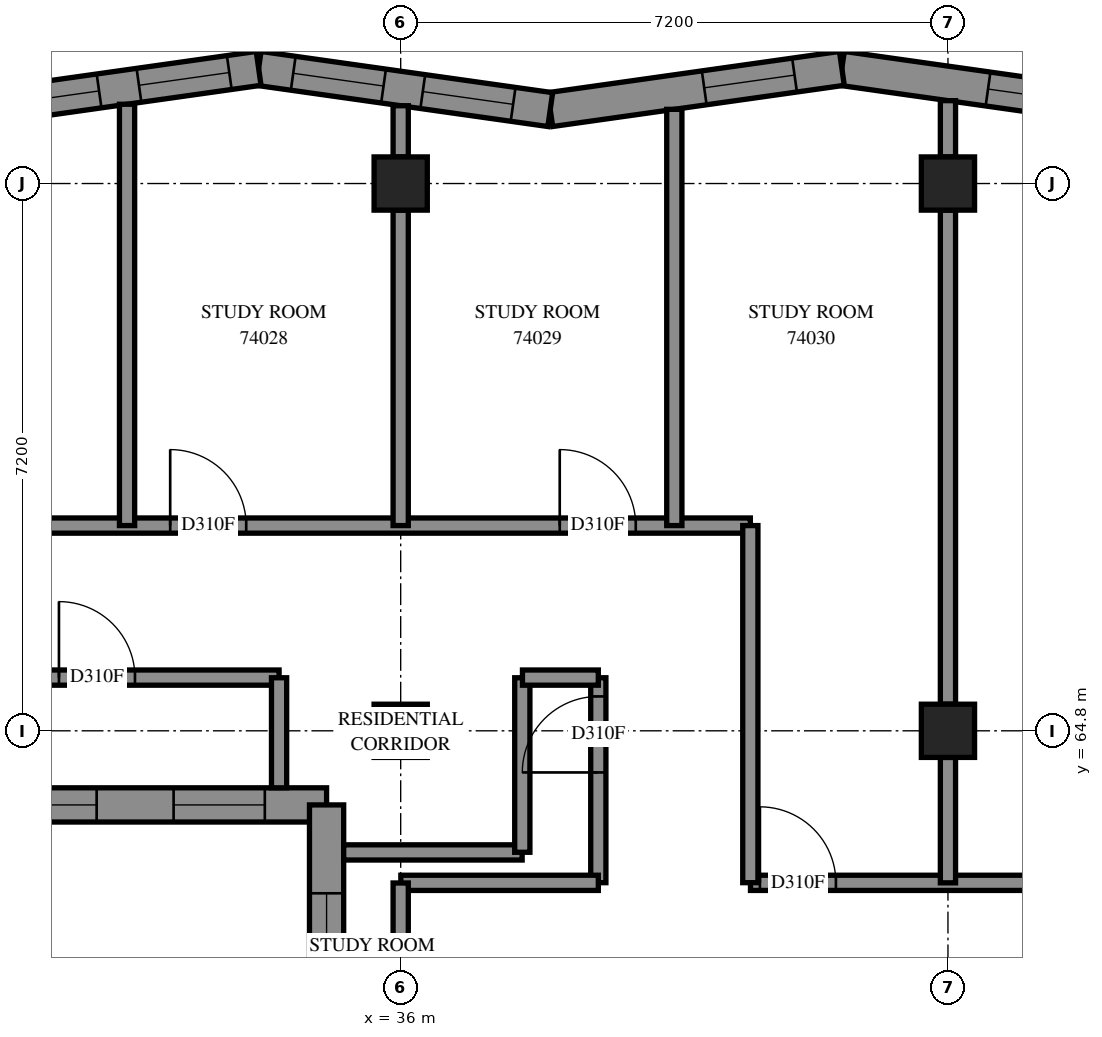
"""IFC4 building model, lengths in metres.
Left out: names, types, materials, properties, quantities, classifications, styles, units other than length and angle.
Written with IfcOpenShell. Run it as: python <this file> out.ifc"""

import sys

from ifc_helpers import new_model, si_unit, direction, frame, frame_2d, origin, origin_2d, place, context, subcontext, project, spatial, polyline, rectangle, outline, extrude, element, fill, save


model = new_model("IFC4")
c1 = context("Model", 3, precision=1e-05, world=origin(), true_north=direction((0.0, 1.0)))
c2 = subcontext(c1, "Body", "Model", "MODEL_VIEW")
j1 = project(units=[si_unit("LENGTHUNIT", "METRE"), si_unit("PLANEANGLEUNIT", "RADIAN")], contexts=[c1])
p1 = place(None, origin())
s1 = spatial("IfcSite", under=j1, at=p1, CompositionType="ELEMENT")
p2 = place(p1, origin())
s2 = spatial("IfcBuilding", under=s1, at=p2, CompositionType="ELEMENT")
p3 = place(p2, frame((0.0, 0.0, 271.0)))
s3 = spatial("IfcBuildingStorey", under=s2, at=p3, CompositionType="ELEMENT", Elevation=271.0)
for number, where, z_axis, x_axis in (
    (1, (36.0, 64.8, 0.0), (0.0, 0.0, 1.0), (1.0, 0.0, 0.0)),
    (2, (36.0, 72.0, 0.0), (0.0, 0.0, 1.0), (1.0, 0.0, 0.0)),
    (3, (43.2, 64.8, 0.0), (0.0, 0.0, 1.0), (1.0, 0.0, 0.0)),
    (4, (43.2, 72.0, 0.0), (0.0, 0.0, 1.0), (1.0, 0.0, 0.0)),
):
    element("IfcColumn", number, at=place(p3, frame(where, z_axis=z_axis, x_axis=x_axis)), inside=s3, PredefinedType="COLUMN", context=c2, shape_type="SweptSolid", body=[
        extrude(rectangle(XDim=0.7, YDim=0.7, at=origin_2d()), origin(), (0.0, 0.0, 1.0), 3.1),
    ])
p4 = place(p3, frame((45.641, 72.973, 0.0), z_axis=(0.0, 0.0, 1.0), x_axis=(-0.9901681853, 0.1398819675, 0.0)))
e5 = element("IfcWall", 5, at=p4, inside=s3, PredefinedType="SOLIDWALL", context=c2, shape_type="SweptSolid", body=[
    extrude(outline(polyline([(0.032, -0.225), (3.906, -0.225), (3.843, 0.225), (-0.032, 0.225), (0.032, -0.225)])), origin(), (0.0, 0.0, 1.0), 3.1),
])
p5 = place(p4, frame((0.733, 0.0, 0.45)))
e6 = element("IfcOpeningElement", 6, at=p5, cuts=e5, PredefinedType="OPENING", context=c2, shape_type="SweptSolid", body=[
    extrude(rectangle(XDim=1.2, YDim=2.55, at=frame_2d((0.6, 1.275))), frame((0.0, 0.235, 0.0), z_axis=(0.0, -1.0, 0.0), x_axis=(1.0, 0.0, 0.0)), (0.0, 0.0, 1.0), 0.47),
])
p6 = place(p3, frame((41.804, 73.515, 0.0), z_axis=(0.0, 0.0, 1.0), x_axis=(-0.9901681853, -0.1398819675, 0.0)))
e7 = element("IfcWall", 7, at=p6, inside=s3, PredefinedType="SOLIDWALL", context=c2, shape_type="SweptSolid", body=[
    extrude(outline(polyline([(-0.032, -0.225), (3.843, -0.225), (3.906, 0.225), (0.032, 0.225), (-0.032, -0.225)])), origin(), (0.0, 0.0, 1.0), 3.1),
])
p7 = place(p6, frame((0.629, 0.0, 0.45)))
e8 = element("IfcOpeningElement", 8, at=p7, cuts=e7, PredefinedType="OPENING", context=c2, shape_type="SweptSolid", body=[
    extrude(rectangle(XDim=1.2, YDim=2.55, at=frame_2d((0.6, 1.275))), frame((0.0, 0.235, 0.0), z_axis=(0.0, -1.0, 0.0), x_axis=(1.0, 0.0, 0.0)), (0.0, 0.0, 1.0), 0.47),
])
p8 = place(p3, frame((37.968, 72.973, 0.0), z_axis=(0.0, 0.0, 1.0), x_axis=(-0.9901676803, 0.1398855422, 0.0)))
e9 = element("IfcWall", 9, at=p8, inside=s3, PredefinedType="SOLIDWALL", context=c2, shape_type="SweptSolid", body=[
    extrude(outline(polyline([(0.032, -0.225), (3.906, -0.225), (3.843, 0.225), (-0.032, 0.225), (0.032, -0.225)])), origin(), (0.0, 0.0, 1.0), 3.1),
])
p9 = place(p8, frame((0.494, 0.0, 0.45)))
e10 = element("IfcOpeningElement", 10, at=p9, cuts=e9, PredefinedType="OPENING", context=c2, shape_type="SweptSolid", body=[
    extrude(rectangle(XDim=1.2, YDim=2.55, at=frame_2d((0.6, 1.275))), frame((0.0, 0.235, 0.0), z_axis=(0.0, -1.0, 0.0), x_axis=(1.0, 0.0, 0.0)), (0.0, 0.0, 1.0), 0.47),
])
p10 = place(p8, frame((2.215, 0.0, 0.45)))
e11 = element("IfcOpeningElement", 11, at=p10, cuts=e9, PredefinedType="OPENING", context=c2, shape_type="SweptSolid", body=[
    extrude(rectangle(XDim=1.2, YDim=2.55, at=frame_2d((0.6, 1.275))), frame((0.0, 0.235, 0.0), z_axis=(0.0, -1.0, 0.0), x_axis=(1.0, 0.0, 0.0)), (0.0, 0.0, 1.0), 0.47),
])
p11 = place(p3, frame((34.131, 73.515, 0.0), z_axis=(0.0, 0.0, 1.0), x_axis=(-0.9901656891, -0.1398996361, 0.0)))
e12 = element("IfcWall", 12, at=p11, inside=s3, PredefinedType="SOLIDWALL", context=c2, shape_type="SweptSolid", body=[
    extrude(outline(polyline([(-0.032, -0.225), (3.843, -0.225), (3.941, 0.225), (0.032, 0.225), (-0.032, -0.225)])), origin(), (0.0, 0.0, 1.0), 3.1),
])
p12 = place(p11, frame((0.39, 0.0, 0.45)))
e13 = element("IfcOpeningElement", 13, at=p12, cuts=e12, PredefinedType="OPENING", context=c2, shape_type="SweptSolid", body=[
    extrude(rectangle(XDim=1.2, YDim=2.55, at=frame_2d((0.6, 1.275))), frame((0.0, 0.235, 0.0), z_axis=(0.0, -1.0, 0.0), x_axis=(1.0, 0.0, 0.0)), (0.0, 0.0, 1.0), 0.47),
])
p13 = place(p11, frame((2.12, 0.0, 0.45)))
e14 = element("IfcOpeningElement", 14, at=p13, cuts=e12, PredefinedType="OPENING", context=c2, shape_type="SweptSolid", body=[
    extrude(rectangle(XDim=1.2, YDim=2.55, at=frame_2d((0.6, 1.275))), frame((0.0, 0.235, 0.0), z_axis=(0.0, -1.0, 0.0), x_axis=(1.0, 0.0, 0.0)), (0.0, 0.0, 1.0), 0.47),
])
p14 = place(p3, frame((26.683, 63.825, 0.0), z_axis=(0.0, 0.0, 1.0), x_axis=(1.0, 0.0, 0.0)))
e15 = element("IfcWall", 15, at=p14, inside=s3, PredefinedType="SOLIDWALL", context=c2, shape_type="SweptSolid", body=[
    extrude(outline(polyline([(-0.225, -0.225), (8.117, -0.225), (8.567, 0.225), (0.225, 0.225), (-0.225, -0.225)])), origin(), (0.0, 0.0, 1.0), 3.1),
])
p15 = place(p14, frame((2.517, 0.0, 0.45)))
e16 = element("IfcOpeningElement", 16, at=p15, cuts=e15, PredefinedType="OPENING", context=c2, shape_type="SweptSolid", body=[
    extrude(rectangle(XDim=2.8, YDim=2.55, at=frame_2d((1.4, 1.275))), frame((0.0, 0.235, 0.0), z_axis=(0.0, -1.0, 0.0), x_axis=(1.0, 0.0, 0.0)), (0.0, 0.0, 1.0), 0.47),
])
p16 = place(p14, frame((0.671, 0.0, 0.45)))
e17 = element("IfcOpeningElement", 17, at=p16, cuts=e15, PredefinedType="OPENING", context=c2, shape_type="SweptSolid", body=[
    extrude(rectangle(XDim=1.2, YDim=2.55, at=frame_2d((0.6, 1.275))), frame((0.0, 0.235, 0.0), z_axis=(0.0, -1.0, 0.0), x_axis=(1.0, 0.0, 0.0)), (0.0, 0.0, 1.0), 0.47),
])
p17 = place(p14, frame((6.33, 0.0, 0.45)))
e18 = element("IfcOpeningElement", 18, at=p17, cuts=e15, PredefinedType="OPENING", context=c2, shape_type="SweptSolid", body=[
    extrude(rectangle(XDim=1.2, YDim=2.55, at=frame_2d((0.6, 1.275))), frame((0.0, 0.235, 0.0), z_axis=(0.0, -1.0, 0.0), x_axis=(1.0, 0.0, 0.0)), (0.0, 0.0, 1.0), 0.47),
])
p18 = place(p3, frame((35.025, 63.825, 0.0), z_axis=(0.0, 0.0, 1.0), x_axis=(0.0, -1.0, 0.0)))
e19 = element("IfcWall", 19, at=p18, inside=s3, PredefinedType="SOLIDWALL", context=c2, shape_type="SweptSolid", body=[
    extrude(outline(polyline([(0.225, -0.225), (7.425, -0.225), (6.975, 0.225), (-0.225, 0.225), (0.225, -0.225)])), origin(), (0.0, 0.0, 1.0), 3.1),
])
p19 = place(p18, frame((3.175, 0.0, 0.45)))
e20 = element("IfcOpeningElement", 20, at=p19, cuts=e19, PredefinedType="OPENING", context=c2, shape_type="SweptSolid", body=[
    extrude(rectangle(XDim=2.8, YDim=2.55, at=frame_2d((1.4, 1.275))), frame((0.0, 0.235, 0.0), z_axis=(0.0, -1.0, 0.0), x_axis=(1.0, 0.0, 0.0)), (0.0, 0.0, 1.0), 0.47),
])
p20 = place(p18, frame((1.163, 0.0, 0.45)))
e21 = element("IfcOpeningElement", 21, at=p20, cuts=e19, PredefinedType="OPENING", context=c2, shape_type="SweptSolid", body=[
    extrude(rectangle(XDim=1.2, YDim=2.55, at=frame_2d((0.6, 1.275))), frame((0.0, 0.235, 0.0), z_axis=(0.0, -1.0, 0.0), x_axis=(1.0, 0.0, 0.0)), (0.0, 0.0, 1.0), 0.47),
])
p21 = place(p3, frame((40.602, 62.8, 0.0), z_axis=(0.0, 0.0, 1.0), x_axis=(1.0, 0.0, 0.0)))
e22 = element("IfcWall", 22, at=p21, inside=s3, PredefinedType="PARTITIONING", context=c2, shape_type="SweptSolid", body=[
    extrude(rectangle(XDim=14.598, YDim=0.2, at=frame_2d((7.299, 0.0))), origin(), (0.0, 0.0, 1.0), 3.1),
])
p22 = place(p21, frame((0.124, 0.0, 0.0)))
e23 = element("IfcOpeningElement", 23, at=p22, cuts=e22, PredefinedType="OPENING", context=c2, shape_type="SweptSolid", body=[
    extrude(rectangle(XDim=1.0, YDim=2.1, at=frame_2d((0.5, 1.05))), frame((0.0, 0.11, 0.0), z_axis=(0.0, -1.0, 0.0), x_axis=(1.0, 0.0, 0.0)), (0.0, 0.0, 1.0), 0.22),
])
p23 = place(p21, frame((4.691, 0.0, 0.0)))
e24 = element("IfcOpeningElement", 24, at=p23, cuts=e22, PredefinedType="OPENING", context=c2, shape_type="SweptSolid", body=[
    extrude(rectangle(XDim=1.0, YDim=2.1, at=frame_2d((0.5, 1.05))), frame((0.0, 0.11, 0.0), z_axis=(0.0, -1.0, 0.0), x_axis=(1.0, 0.0, 0.0)), (0.0, 0.0, 1.0), 0.22),
])
p24 = place(p21, frame((6.766, 0.0, 0.0)))
e25 = element("IfcOpeningElement", 25, at=p24, cuts=e22, PredefinedType="OPENING", context=c2, shape_type="SweptSolid", body=[
    extrude(rectangle(XDim=1.0, YDim=2.1, at=frame_2d((0.5, 1.05))), frame((0.0, 0.11, 0.0), z_axis=(0.0, -1.0, 0.0), x_axis=(1.0, 0.0, 0.0)), (0.0, 0.0, 1.0), 0.22),
])
p25 = place(p21, frame((11.89, 0.0, 0.0)))
e26 = element("IfcOpeningElement", 26, at=p25, cuts=e22, PredefinedType="OPENING", context=c2, shape_type="SweptSolid", body=[
    extrude(rectangle(XDim=1.0, YDim=2.1, at=frame_2d((0.5, 1.05))), frame((0.0, 0.11, 0.0), z_axis=(0.0, -1.0, 0.0), x_axis=(1.0, 0.0, 0.0)), (0.0, 0.0, 1.0), 0.22),
])
p26 = place(p3, frame((28.802, 67.5, 0.0), z_axis=(0.0, 0.0, 1.0), x_axis=(1.0, 0.0, 0.0)))
e27 = element("IfcWall", 27, at=p26, inside=s3, PredefinedType="PARTITIONING", context=c2, shape_type="SweptSolid", body=[
    extrude(rectangle(XDim=11.798, YDim=0.2, at=frame_2d((5.899, 0.0))), origin(), (0.0, 0.0, 1.0), 3.1),
])
p27 = place(p26, frame((4.165, 0.0, 0.0)))
e28 = element("IfcOpeningElement", 28, at=p27, cuts=e27, PredefinedType="OPENING", context=c2, shape_type="SweptSolid", body=[
    extrude(rectangle(XDim=1.0, YDim=2.1, at=frame_2d((0.5, 1.05))), frame((0.0, 0.11, 0.0), z_axis=(0.0, -1.0, 0.0), x_axis=(1.0, 0.0, 0.0)), (0.0, 0.0, 1.0), 0.22),
])
p28 = place(p26, frame((9.29, 0.0, 0.0)))
e29 = element("IfcOpeningElement", 29, at=p28, cuts=e27, PredefinedType="OPENING", context=c2, shape_type="SweptSolid", body=[
    extrude(rectangle(XDim=1.0, YDim=2.1, at=frame_2d((0.5, 1.05))), frame((0.0, 0.11, 0.0), z_axis=(0.0, -1.0, 0.0), x_axis=(1.0, 0.0, 0.0)), (0.0, 0.0, 1.0), 0.22),
])
p29 = place(p3, frame((43.2, 65.15, 0.0), z_axis=(0.0, 0.0, 1.0), x_axis=(0.0, 1.0, 0.0)))
e30 = element("IfcWall", 30, at=p29, inside=s3, PredefinedType="PARTITIONING", context=c2, shape_type="SweptSolid", body=[
    extrude(rectangle(XDim=6.5, YDim=0.2, at=frame_2d((3.25, 0.0))), origin(), (0.0, 0.0, 1.0), 3.1),
])
p30 = place(p3, frame((28.802, 65.5, 0.0), z_axis=(0.0, 0.0, 1.0), x_axis=(1.0, 0.0, 0.0)))
e31 = element("IfcWall", 31, at=p30, inside=s3, PredefinedType="PARTITIONING", context=c2, shape_type="SweptSolid", body=[
    extrude(rectangle(XDim=5.598, YDim=0.2, at=frame_2d((2.799, 0.0))), origin(), (0.0, 0.0, 1.0), 3.1),
])
p31 = place(p30, frame((2.702, 0.0, 0.0)))
e32 = element("IfcOpeningElement", 32, at=p31, cuts=e31, PredefinedType="OPENING", context=c2, shape_type="SweptSolid", body=[
    extrude(rectangle(XDim=1.0, YDim=2.1, at=frame_2d((0.5, 1.05))), frame((0.0, 0.11, 0.0), z_axis=(0.0, -1.0, 0.0), x_axis=(1.0, 0.0, 0.0)), (0.0, 0.0, 1.0), 0.22),
])
p32 = place(p3, frame((32.4, 67.5, 0.0), z_axis=(0.0, 0.0, 1.0), x_axis=(0.0, 1.0, 0.0)))
e33 = element("IfcWall", 33, at=p32, inside=s3, PredefinedType="PARTITIONING", context=c2, shape_type="SweptSolid", body=[
    extrude(rectangle(XDim=5.543, YDim=0.2, at=frame_2d((2.772, 0.0))), origin(), (0.0, 0.0, 1.0), 3.1),
])
p33 = place(p3, frame((39.6, 67.5, 0.0), z_axis=(0.0, 0.0, 1.0), x_axis=(0.0, 1.0, 0.0)))
e34 = element("IfcWall", 34, at=p33, inside=s3, PredefinedType="PARTITIONING", context=c2, shape_type="SweptSolid", body=[
    extrude(rectangle(XDim=5.476, YDim=0.2, at=frame_2d((2.738, 0.0))), origin(), (0.0, 0.0, 1.0), 3.1),
])
p34 = place(p3, frame((40.6, 62.802, 0.0), z_axis=(0.0, 0.0, 1.0), x_axis=(0.0, 1.0, 0.0)))
e35 = element("IfcWall", 35, at=p34, inside=s3, PredefinedType="PARTITIONING", context=c2, shape_type="SweptSolid", body=[
    extrude(rectangle(XDim=4.698, YDim=0.2, at=frame_2d((2.349, 0.0))), origin(), (0.0, 0.0, 1.0), 3.1),
])
p35 = place(p3, frame((36.0, 67.5, 0.0), z_axis=(0.0, 0.0, 1.0), x_axis=(0.0, 1.0, 0.0)))
e36 = element("IfcWall", 36, at=p35, inside=s3, PredefinedType="PARTITIONING", context=c2, shape_type="SweptSolid", body=[
    extrude(rectangle(XDim=4.15, YDim=0.2, at=frame_2d((2.075, 0.0))), origin(), (0.0, 0.0, 1.0), 3.1),
])
p36 = place(p3, frame((38.6, 62.802, 0.0), z_axis=(0.0, 0.0, 1.0), x_axis=(0.0, 1.0, 0.0)))
e37 = element("IfcWall", 37, at=p36, inside=s3, PredefinedType="PARTITIONING", context=c2, shape_type="SweptSolid", body=[
    extrude(rectangle(XDim=2.696, YDim=0.2, at=frame_2d((1.348, 0.0))), origin(), (0.0, 0.0, 1.0), 3.1),
])
p37 = place(p36, frame((1.45, 0.0, 0.0)))
e38 = element("IfcOpeningElement", 38, at=p37, cuts=e37, PredefinedType="OPENING", context=c2, shape_type="SweptSolid", body=[
    extrude(rectangle(XDim=1.0, YDim=2.1, at=frame_2d((0.5, 1.05))), frame((0.0, 0.11, 0.0), z_axis=(0.0, -1.0, 0.0), x_axis=(1.0, 0.0, 0.0)), (0.0, 0.0, 1.0), 0.22),
])
p38 = place(p3, frame((36.002, 62.8, 0.0), z_axis=(0.0, 0.0, 1.0), x_axis=(1.0, 0.0, 0.0)))
e39 = element("IfcWall", 39, at=p38, inside=s3, PredefinedType="PARTITIONING", context=c2, shape_type="SweptSolid", body=[
    extrude(rectangle(XDim=2.598, YDim=0.2, at=frame_2d((1.299, 0.0))), origin(), (0.0, 0.0, 1.0), 3.1),
])
p39 = place(p3, frame((35.25, 63.2, 0.0), z_axis=(0.0, 0.0, 1.0), x_axis=(1.0, 0.0, 0.0)))
e40 = element("IfcWall", 40, at=p39, inside=s3, PredefinedType="PARTITIONING", context=c2, shape_type="SweptSolid", body=[
    extrude(rectangle(XDim=2.348, YDim=0.2, at=frame_2d((1.174, 0.0))), origin(), (0.0, 0.0, 1.0), 3.1),
])
p40 = place(p3, frame((37.6, 63.202, 0.0), z_axis=(0.0, 0.0, 1.0), x_axis=(0.0, 1.0, 0.0)))
e41 = element("IfcWall", 41, at=p40, inside=s3, PredefinedType="PARTITIONING", context=c2, shape_type="SweptSolid", body=[
    extrude(rectangle(XDim=2.296, YDim=0.2, at=frame_2d((1.148, 0.0))), origin(), (0.0, 0.0, 1.0), 3.1),
])
p41 = place(p3, frame((36.0, 60.802, 0.0), z_axis=(0.0, 0.0, 1.0), x_axis=(0.0, 1.0, 0.0)))
e42 = element("IfcWall", 42, at=p41, inside=s3, PredefinedType="PARTITIONING", context=c2, shape_type="SweptSolid", body=[
    extrude(rectangle(XDim=1.996, YDim=0.2, at=frame_2d((0.998, 0.0))), origin(), (0.0, 0.0, 1.0), 2.6),
])
p42 = place(p3, frame((43.2, 62.8, 0.0), z_axis=(0.0, 0.0, 1.0), x_axis=(0.0, 1.0, 0.0)))
e43 = element("IfcWall", 43, at=p42, inside=s3, PredefinedType="PARTITIONING", context=c2, shape_type="SweptSolid", body=[
    extrude(rectangle(XDim=1.65, YDim=0.2, at=frame_2d((0.825, 0.0))), origin(), (0.0, 0.0, 1.0), 3.1),
])
p43 = place(p3, frame((34.4, 64.05, 0.0), z_axis=(0.0, 0.0, 1.0), x_axis=(0.0, 1.0, 0.0)))
e44 = element("IfcWall", 44, at=p43, inside=s3, PredefinedType="PARTITIONING", context=c2, shape_type="SweptSolid", body=[
    extrude(rectangle(XDim=1.448, YDim=0.2, at=frame_2d((0.724, 0.0))), origin(), (0.0, 0.0, 1.0), 3.1),
])
p44 = place(p3, frame((37.602, 65.5, 0.0), z_axis=(0.0, 0.0, 1.0), x_axis=(1.0, 0.0, 0.0)))
e45 = element("IfcWall", 45, at=p44, inside=s3, PredefinedType="PARTITIONING", context=c2, shape_type="SweptSolid", body=[
    extrude(rectangle(XDim=0.998, YDim=0.2, at=frame_2d((0.499, 0.0))), origin(), (0.0, 0.0, 1.0), 3.1),
])
p45 = place(p3, frame((43.2, 72.35, 0.0), z_axis=(0.0, 0.0, 1.0), x_axis=(0.0, 1.0, 0.0)))
e46 = element("IfcWall", 46, at=p45, inside=s3, PredefinedType="PARTITIONING", context=c2, shape_type="SweptSolid", body=[
    extrude(rectangle(XDim=0.74, YDim=0.2, at=frame_2d((0.37, 0.0))), origin(), (0.0, 0.0, 1.0), 3.1),
])
p46 = place(p3, frame((36.0, 72.35, 0.0), z_axis=(0.0, 0.0, 1.0), x_axis=(0.0, 1.0, 0.0)))
e47 = element("IfcWall", 47, at=p46, inside=s3, PredefinedType="PARTITIONING", context=c2, shape_type="SweptSolid", body=[
    extrude(rectangle(XDim=0.673, YDim=0.2, at=frame_2d((0.337, 0.0))), origin(), (0.0, 0.0, 1.0), 3.1),
])
p47 = place(p5, origin())
e48 = element("IfcWindow", 48, at=p47, inside=s3, PartitioningType="SINGLE_PANEL", PredefinedType="WINDOW", context=c2, shape_type="SweptSolid", body=[
    extrude(rectangle(XDim=1.2, YDim=2.55, at=frame_2d((0.6, 1.275))), frame((0.0, 0.205, 0.0), z_axis=(0.0, -1.0, 0.0), x_axis=(1.0, 0.0, 0.0)), (0.0, 0.0, 1.0), 0.06),
])
fill(e6, e48)
p48 = place(p7, origin())
e49 = element("IfcWindow", 49, at=p48, inside=s3, PartitioningType="SINGLE_PANEL", PredefinedType="WINDOW", context=c2, shape_type="SweptSolid", body=[
    extrude(rectangle(XDim=1.2, YDim=2.55, at=frame_2d((0.6, 1.275))), frame((0.0, 0.205, 0.0), z_axis=(0.0, -1.0, 0.0), x_axis=(1.0, 0.0, 0.0)), (0.0, 0.0, 1.0), 0.06),
])
fill(e8, e49)
p49 = place(p9, origin())
e50 = element("IfcWindow", 50, at=p49, inside=s3, PartitioningType="SINGLE_PANEL", PredefinedType="WINDOW", context=c2, shape_type="SweptSolid", body=[
    extrude(rectangle(XDim=1.2, YDim=2.55, at=frame_2d((0.6, 1.275))), frame((0.0, 0.205, 0.0), z_axis=(0.0, -1.0, 0.0), x_axis=(1.0, 0.0, 0.0)), (0.0, 0.0, 1.0), 0.06),
])
fill(e10, e50)
p50 = place(p10, origin())
e51 = element("IfcWindow", 51, at=p50, inside=s3, PartitioningType="SINGLE_PANEL", PredefinedType="WINDOW", context=c2, shape_type="SweptSolid", body=[
    extrude(rectangle(XDim=1.2, YDim=2.55, at=frame_2d((0.6, 1.275))), frame((0.0, 0.205, 0.0), z_axis=(0.0, -1.0, 0.0), x_axis=(1.0, 0.0, 0.0)), (0.0, 0.0, 1.0), 0.06),
])
fill(e11, e51)
p51 = place(p12, origin())
e52 = element("IfcWindow", 52, at=p51, inside=s3, PartitioningType="SINGLE_PANEL", PredefinedType="WINDOW", context=c2, shape_type="SweptSolid", body=[
    extrude(rectangle(XDim=1.2, YDim=2.55, at=frame_2d((0.6, 1.275))), frame((0.0, 0.205, 0.0), z_axis=(0.0, -1.0, 0.0), x_axis=(1.0, 0.0, 0.0)), (0.0, 0.0, 1.0), 0.06),
])
fill(e13, e52)
p52 = place(p13, origin())
e53 = element("IfcWindow", 53, at=p52, inside=s3, PartitioningType="SINGLE_PANEL", PredefinedType="WINDOW", context=c2, shape_type="SweptSolid", body=[
    extrude(rectangle(XDim=1.2, YDim=2.55, at=frame_2d((0.6, 1.275))), frame((0.0, 0.205, 0.0), z_axis=(0.0, -1.0, 0.0), x_axis=(1.0, 0.0, 0.0)), (0.0, 0.0, 1.0), 0.06),
])
fill(e14, e53)
p53 = place(p15, origin())
e54 = element("IfcWindow", 54, at=p53, inside=s3, PartitioningType="SINGLE_PANEL", PredefinedType="WINDOW", context=c2, shape_type="SweptSolid", body=[
    extrude(rectangle(XDim=2.8, YDim=2.55, at=frame_2d((1.4, 1.275))), frame((0.0, 0.205, 0.0), z_axis=(0.0, -1.0, 0.0), x_axis=(1.0, 0.0, 0.0)), (0.0, 0.0, 1.0), 0.06),
])
fill(e16, e54)
p54 = place(p17, origin())
e55 = element("IfcWindow", 55, at=p54, inside=s3, PartitioningType="SINGLE_PANEL", PredefinedType="WINDOW", context=c2, shape_type="SweptSolid", body=[
    extrude(rectangle(XDim=1.2, YDim=2.55, at=frame_2d((0.6, 1.275))), frame((0.0, 0.205, 0.0), z_axis=(0.0, -1.0, 0.0), x_axis=(1.0, 0.0, 0.0)), (0.0, 0.0, 1.0), 0.06),
])
fill(e18, e55)
p55 = place(p20, origin())
e56 = element("IfcWindow", 56, at=p55, inside=s3, PartitioningType="SINGLE_PANEL", PredefinedType="WINDOW", context=c2, shape_type="SweptSolid", body=[
    extrude(rectangle(XDim=1.2, YDim=2.55, at=frame_2d((0.6, 1.275))), frame((0.0, 0.205, 0.0), z_axis=(0.0, -1.0, 0.0), x_axis=(1.0, 0.0, 0.0)), (0.0, 0.0, 1.0), 0.06),
])
fill(e21, e56)
p56 = place(p37, origin())
e57 = element("IfcDoor", 57, at=p56, inside=s3, OperationType="SINGLE_SWING_LEFT", PredefinedType="DOOR", context=c2, shape_type="SweptSolid", body=[
    extrude(rectangle(XDim=1.0, YDim=2.1, at=frame_2d((0.5, 1.05))), frame((0.0, 0.025, 0.0), z_axis=(0.0, -1.0, 0.0), x_axis=(1.0, 0.0, 0.0)), (0.0, 0.0, 1.0), 0.05),
])
fill(e38, e57)
p57 = place(p31, origin())
e58 = element("IfcDoor", 58, at=p57, inside=s3, OperationType="SINGLE_SWING_RIGHT", PredefinedType="DOOR", context=c2, shape_type="SweptSolid", body=[
    extrude(rectangle(XDim=1.0, YDim=2.1, at=frame_2d((0.5, 1.05))), frame((0.0, 0.025, 0.0), z_axis=(0.0, -1.0, 0.0), x_axis=(1.0, 0.0, 0.0)), (0.0, 0.0, 1.0), 0.05),
])
fill(e32, e58)
p58 = place(p27, origin())
e59 = element("IfcDoor", 59, at=p58, inside=s3, OperationType="SINGLE_SWING_LEFT", PredefinedType="DOOR", context=c2, shape_type="SweptSolid", body=[
    extrude(rectangle(XDim=1.0, YDim=2.1, at=frame_2d((0.5, 1.05))), frame((0.0, 0.025, 0.0), z_axis=(0.0, -1.0, 0.0), x_axis=(1.0, 0.0, 0.0)), (0.0, 0.0, 1.0), 0.05),
])
fill(e28, e59)
p59 = place(p28, origin())
e60 = element("IfcDoor", 60, at=p59, inside=s3, OperationType="SINGLE_SWING_RIGHT", PredefinedType="DOOR", context=c2, shape_type="SweptSolid", body=[
    extrude(rectangle(XDim=1.0, YDim=2.1, at=frame_2d((0.5, 1.05))), frame((0.0, 0.025, 0.0), z_axis=(0.0, -1.0, 0.0), x_axis=(1.0, 0.0, 0.0)), (0.0, 0.0, 1.0), 0.05),
])
fill(e29, e60)
p60 = place(p22, origin())
e61 = element("IfcDoor", 61, at=p60, inside=s3, OperationType="SINGLE_SWING_LEFT", PredefinedType="DOOR", context=c2, shape_type="SweptSolid", body=[
    extrude(rectangle(XDim=1.0, YDim=2.1, at=frame_2d((0.5, 1.05))), frame((0.0, 0.025, 0.0), z_axis=(0.0, -1.0, 0.0), x_axis=(1.0, 0.0, 0.0)), (0.0, 0.0, 1.0), 0.05),
])
fill(e23, e61)
save(model, sys.argv[1])
